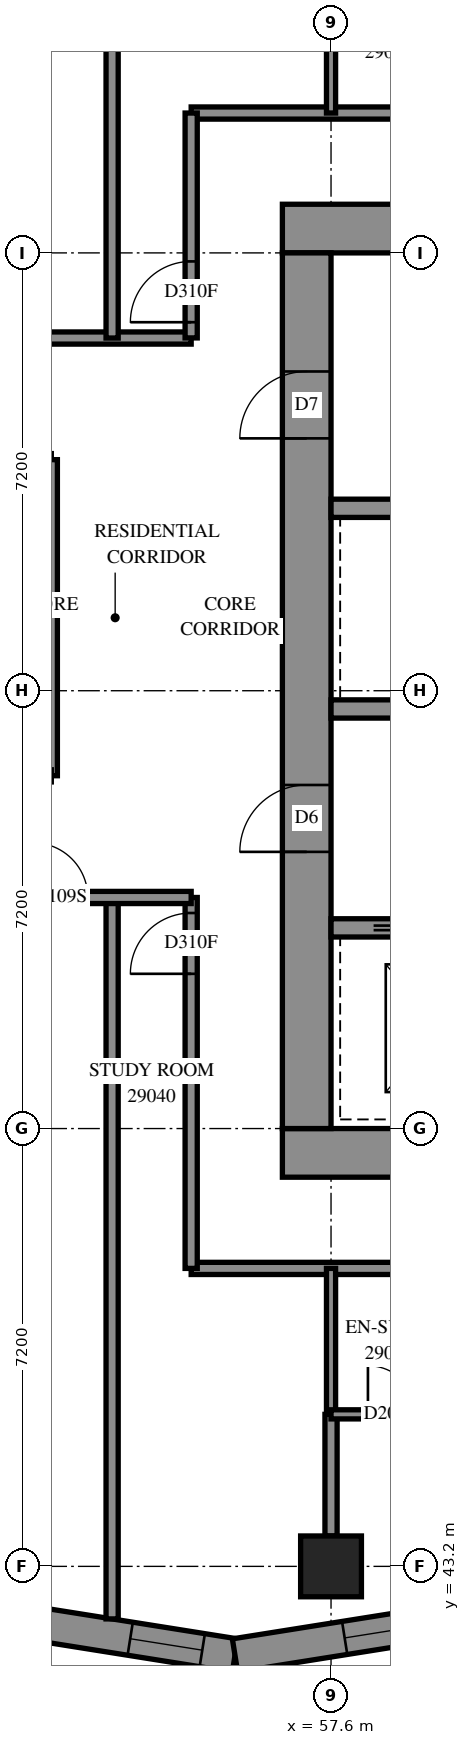
"""IFC4 building model, lengths in metres.
Left out: names, types, materials, properties, quantities, classifications, styles, units other than length and angle.
Written with IfcOpenShell. Run it as: python <this file> out.ifc"""

import sys

from ifc_helpers import new_model, si_unit, direction, frame, frame_2d, origin, origin_2d, place, context, subcontext, project, spatial, polyline, rectangle, outline, extrude, element, fill, save


model = new_model("IFC4")
c1 = context("Model", 3, precision=1e-05, world=origin(), true_north=direction((0.0, 1.0)))
c2 = subcontext(c1, "Body", "Model", "MODEL_VIEW")
j1 = project(units=[si_unit("LENGTHUNIT", "METRE"), si_unit("PLANEANGLEUNIT", "RADIAN")], contexts=[c1])
p1 = place(None, origin())
s1 = spatial("IfcSite", under=j1, at=p1, CompositionType="ELEMENT")
p2 = place(p1, origin())
s2 = spatial("IfcBuilding", under=s1, at=p2, CompositionType="ELEMENT")
p3 = place(p2, frame((0.0, 0.0, 108.4)))
s3 = spatial("IfcBuildingStorey", under=s2, at=p3, CompositionType="ELEMENT", Elevation=108.4)
p4 = place(p3, frame((57.6, 43.2, 0.0), z_axis=(0.0, 0.0, 1.0), x_axis=(1.0, 0.0, 0.0)))
e1 = element("IfcColumn", 1, at=p4, inside=s3, PredefinedType="COLUMN", context=c2, shape_type="SweptSolid", body=[
    extrude(rectangle(XDim=1.0, YDim=1.0, at=origin_2d()), origin(), (0.0, 0.0, 1.0), 3.1),
])
p5 = place(p3, frame((56.8, 50.0, -0.3), z_axis=(0.0, 0.0, 1.0), x_axis=(1.0, 0.0, 0.0)))
e2 = element("IfcWall", 2, at=p5, inside=s3, PredefinedType="SHEAR", context=c2, shape_type="SweptSolid", body=[
    extrude(rectangle(XDim=16.0, YDim=0.8, at=frame_2d((8.0, 0.0))), origin(), (0.0, 0.0, 1.0), 2.7),
])
p6 = place(p3, frame((56.8, 65.2, -0.3), z_axis=(0.0, 0.0, 1.0), x_axis=(1.0, 0.0, 0.0)))
e3 = element("IfcWall", 3, at=p6, inside=s3, PredefinedType="SHEAR", context=c2, shape_type="SweptSolid", body=[
    extrude(rectangle(XDim=16.0, YDim=0.8, at=frame_2d((8.0, 0.0))), origin(), (0.0, 0.0, 1.0), 2.7),
])
p7 = place(p6, frame((10.8, 0.0, 0.3)))
e4 = element("IfcOpeningElement", 4, at=p7, cuts=e3, PredefinedType="OPENING", context=c2, shape_type="SweptSolid", body=[
    extrude(rectangle(XDim=0.8, YDim=2.1, at=frame_2d((0.4, 1.05))), frame((0.0, 0.41, 0.0), z_axis=(0.0, -1.0, 0.0), x_axis=(1.0, 0.0, 0.0)), (0.0, 0.0, 1.0), 0.82),
])
p8 = place(p3, frame((57.2, 50.4, -0.3), z_axis=(0.0, 0.0, 1.0), x_axis=(0.0, 1.0, 0.0)))
e5 = element("IfcWall", 5, at=p8, inside=s3, PredefinedType="SHEAR", context=c2, shape_type="SweptSolid", body=[
    extrude(rectangle(XDim=14.4, YDim=0.8, at=frame_2d((7.2, 0.0))), origin(), (0.0, 0.0, 1.0), 2.7),
])
p9 = place(p8, frame((4.55, 0.0, 0.3)))
e6 = element("IfcOpeningElement", 6, at=p9, cuts=e5, PredefinedType="OPENING", context=c2, shape_type="SweptSolid", body=[
    extrude(rectangle(XDim=1.1, YDim=2.1, at=frame_2d((0.55, 1.05))), frame((0.0, 0.41, 0.0), z_axis=(0.0, -1.0, 0.0), x_axis=(1.0, 0.0, 0.0)), (0.0, 0.0, 1.0), 0.82),
])
p10 = place(p8, frame((11.35, 0.0, 0.3)))
e7 = element("IfcOpeningElement", 7, at=p10, cuts=e5, PredefinedType="OPENING", context=c2, shape_type="SweptSolid", body=[
    extrude(rectangle(XDim=1.1, YDim=2.1, at=frame_2d((0.55, 1.05))), frame((0.0, 0.41, 0.0), z_axis=(0.0, -1.0, 0.0), x_axis=(1.0, 0.0, 0.0)), (0.0, 0.0, 1.0), 0.82),
])
p11 = place(p3, frame((57.6, 53.7, 0.0), z_axis=(0.0, 0.0, 1.0), x_axis=(1.0, 0.0, 0.0)))
e8 = element("IfcWall", 8, at=p11, inside=s3, PredefinedType="SOLIDWALL", context=c2, shape_type="SweptSolid", body=[
    extrude(rectangle(XDim=14.4, YDim=0.3, at=frame_2d((7.2, 0.0))), origin(), (0.0, 0.0, 1.0), 3.1),
])
p12 = place(p11, frame((1.25, 0.0, 0.0)))
e9 = element("IfcOpeningElement", 9, at=p12, cuts=e8, PredefinedType="OPENING", context=c2, shape_type="SweptSolid", body=[
    extrude(rectangle(XDim=1.1, YDim=2.1, at=frame_2d((0.55, 1.05))), frame((0.0, 0.16, 0.0), z_axis=(0.0, -1.0, 0.0), x_axis=(1.0, 0.0, 0.0)), (0.0, 0.0, 1.0), 0.32),
])
p13 = place(p11, frame((4.85, 0.0, 0.0)))
e10 = element("IfcOpeningElement", 10, at=p13, cuts=e8, PredefinedType="OPENING", context=c2, shape_type="SweptSolid", body=[
    extrude(rectangle(XDim=1.1, YDim=2.1, at=frame_2d((0.55, 1.05))), frame((0.0, 0.16, 0.0), z_axis=(0.0, -1.0, 0.0), x_axis=(1.0, 0.0, 0.0)), (0.0, 0.0, 1.0), 0.32),
])
p14 = place(p11, frame((8.45, 0.0, 0.0)))
e11 = element("IfcOpeningElement", 11, at=p14, cuts=e8, PredefinedType="OPENING", context=c2, shape_type="SweptSolid", body=[
    extrude(rectangle(XDim=1.1, YDim=2.1, at=frame_2d((0.55, 1.05))), frame((0.0, 0.16, 0.0), z_axis=(0.0, -1.0, 0.0), x_axis=(1.0, 0.0, 0.0)), (0.0, 0.0, 1.0), 0.32),
])
p15 = place(p11, frame((12.05, 0.0, 0.0)))
e12 = element("IfcOpeningElement", 12, at=p15, cuts=e8, PredefinedType="OPENING", context=c2, shape_type="SweptSolid", body=[
    extrude(rectangle(XDim=1.1, YDim=2.1, at=frame_2d((0.55, 1.05))), frame((0.0, 0.16, 0.0), z_axis=(0.0, -1.0, 0.0), x_axis=(1.0, 0.0, 0.0)), (0.0, 0.0, 1.0), 0.32),
])
p16 = place(p3, frame((57.6, 57.3, 0.0), z_axis=(0.0, 0.0, 1.0), x_axis=(1.0, 0.0, 0.0)))
e13 = element("IfcWall", 13, at=p16, inside=s3, PredefinedType="SOLIDWALL", context=c2, shape_type="SweptSolid", body=[
    extrude(rectangle(XDim=14.4, YDim=0.3, at=frame_2d((7.2, 0.0))), origin(), (0.0, 0.0, 1.0), 3.1),
])
p17 = place(p16, frame((12.05, 0.0, 0.0)))
e14 = element("IfcOpeningElement", 14, at=p17, cuts=e13, PredefinedType="OPENING", context=c2, shape_type="SweptSolid", body=[
    extrude(rectangle(XDim=1.1, YDim=2.1, at=frame_2d((0.55, 1.05))), frame((0.0, 0.16, 0.0), z_axis=(0.0, -1.0, 0.0), x_axis=(1.0, 0.0, 0.0)), (0.0, 0.0, 1.0), 0.32),
])
p18 = place(p3, frame((57.6, 60.6, 0.0), z_axis=(0.0, 0.0, 1.0), x_axis=(1.0, 0.0, 0.0)))
e15 = element("IfcWall", 15, at=p18, inside=s3, PredefinedType="SOLIDWALL", context=c2, shape_type="SweptSolid", body=[
    extrude(rectangle(XDim=7.2, YDim=0.3, at=frame_2d((3.6, 0.0))), origin(), (0.0, 0.0, 1.0), 3.1),
])
p19 = place(p3, frame((52.587, 42.282, 0.0), z_axis=(0.0, 0.0, 1.0), x_axis=(0.9876057519, -0.1569550219, 0.0)))
e16 = element("IfcWall", 16, at=p19, inside=s3, PredefinedType="SOLIDWALL", context=c2, shape_type="SweptSolid", body=[
    extrude(outline(polyline([(0.067, -0.275), (3.521, -0.275), (3.433, 0.275), (-0.067, 0.275), (0.067, -0.275)])), origin(), (0.0, 0.0, 1.0), 3.1),
])
p20 = place(p19, frame((1.732, 0.0, 0.5)))
e17 = element("IfcOpeningElement", 17, at=p20, cuts=e16, PredefinedType="OPENING", context=c2, shape_type="SweptSolid", body=[
    extrude(rectangle(XDim=1.2, YDim=2.45, at=frame_2d((0.6, 1.225))), frame((0.0, 0.285, 0.0), z_axis=(0.0, -1.0, 0.0), x_axis=(1.0, 0.0, 0.0)), (0.0, 0.0, 1.0), 0.57),
])
p21 = place(p3, frame((56.021, 41.736, 0.0), z_axis=(0.0, 0.0, 1.0), x_axis=(0.9876056196, 0.1569558544, 0.0)))
e18 = element("IfcWall", 18, at=p21, inside=s3, PredefinedType="SOLIDWALL", context=c2, shape_type="SweptSolid", body=[
    extrude(outline(polyline([(-0.044, -0.275), (3.409, -0.275), (3.497, 0.275), (0.044, 0.275), (-0.044, -0.275)])), origin(), (0.0, 0.0, 1.0), 3.1),
])
p22 = place(p21, frame((1.826, 0.0, 0.5)))
e19 = element("IfcOpeningElement", 19, at=p22, cuts=e18, PredefinedType="OPENING", context=c2, shape_type="SweptSolid", body=[
    extrude(rectangle(XDim=1.2, YDim=2.45, at=frame_2d((0.6, 1.225))), frame((0.0, 0.285, 0.0), z_axis=(0.0, -1.0, 0.0), x_axis=(1.0, 0.0, 0.0)), (0.0, 0.0, 1.0), 0.57),
])
p23 = place(p3, frame((33.4, 63.4, 0.0), z_axis=(0.0, 0.0, 1.0), x_axis=(1.0, 0.0, 0.0)))
e20 = element("IfcWall", 20, at=p23, inside=s3, PredefinedType="PARTITIONING", context=c2, shape_type="SweptSolid", body=[
    extrude(rectangle(XDim=21.9, YDim=0.2, at=frame_2d((10.95, 0.0))), origin(), (0.0, 0.0, 1.0), 3.1),
])
p24 = place(p23, frame((3.152, 0.0, 0.0)))
e21 = element("IfcOpeningElement", 21, at=p24, cuts=e20, PredefinedType="OPENING", context=c2, shape_type="SweptSolid", body=[
    extrude(rectangle(XDim=0.9, YDim=2.1, at=frame_2d((0.45, 1.05))), frame((0.0, 0.11, 0.0), z_axis=(0.0, -1.0, 0.0), x_axis=(1.0, 0.0, 0.0)), (0.0, 0.0, 1.0), 0.22),
])
p25 = place(p23, frame((8.161, 0.0, 0.0)))
e22 = element("IfcOpeningElement", 22, at=p25, cuts=e20, PredefinedType="OPENING", context=c2, shape_type="SweptSolid", body=[
    extrude(rectangle(XDim=0.9, YDim=2.1, at=frame_2d((0.45, 1.05))), frame((0.0, 0.11, 0.0), z_axis=(0.0, -1.0, 0.0), x_axis=(1.0, 0.0, 0.0)), (0.0, 0.0, 1.0), 0.22),
])
p26 = place(p23, frame((15.471, 0.0, 0.0)))
e23 = element("IfcOpeningElement", 23, at=p26, cuts=e20, PredefinedType="OPENING", context=c2, shape_type="SweptSolid", body=[
    extrude(rectangle(XDim=1.0, YDim=2.1, at=frame_2d((0.5, 1.05))), frame((0.0, 0.11, 0.0), z_axis=(0.0, -1.0, 0.0), x_axis=(1.0, 0.0, 0.0)), (0.0, 0.0, 1.0), 0.22),
])
p27 = place(p3, frame((55.3, 48.1, 0.0), z_axis=(0.0, 0.0, 1.0), x_axis=(1.0, 0.0, 0.0)))
e24 = element("IfcWall", 24, at=p27, inside=s3, PredefinedType="PARTITIONING", context=c2, shape_type="SweptSolid", body=[
    extrude(rectangle(XDim=19.092, YDim=0.2, at=frame_2d((9.546, 0.0))), origin(), (0.0, 0.0, 1.0), 3.1),
])
p28 = place(p27, frame((4.6, 0.0, 0.0)))
e25 = element("IfcOpeningElement", 25, at=p28, cuts=e24, PredefinedType="OPENING", context=c2, shape_type="SweptSolid", body=[
    extrude(rectangle(XDim=0.9, YDim=2.1, at=frame_2d((0.45, 1.05))), frame((0.0, 0.11, 0.0), z_axis=(0.0, -1.0, 0.0), x_axis=(1.0, 0.0, 0.0)), (0.0, 0.0, 1.0), 0.22),
])
p29 = place(p27, frame((8.239, 0.0, 0.0)))
e26 = element("IfcOpeningElement", 26, at=p29, cuts=e24, PredefinedType="OPENING", context=c2, shape_type="SweptSolid", body=[
    extrude(rectangle(XDim=0.9, YDim=2.1, at=frame_2d((0.45, 1.05))), frame((0.0, 0.11, 0.0), z_axis=(0.0, -1.0, 0.0), x_axis=(1.0, 0.0, 0.0)), (0.0, 0.0, 1.0), 0.22),
])
p30 = place(p27, frame((13.5, 0.0, 0.0)))
e27 = element("IfcOpeningElement", 27, at=p30, cuts=e24, PredefinedType="OPENING", context=c2, shape_type="SweptSolid", body=[
    extrude(rectangle(XDim=0.9, YDim=2.1, at=frame_2d((0.45, 1.05))), frame((0.0, 0.11, 0.0), z_axis=(0.0, -1.0, 0.0), x_axis=(1.0, 0.0, 0.0)), (0.0, 0.0, 1.0), 0.22),
])
p31 = place(p3, frame((55.3, 67.1, 0.0), z_axis=(0.0, 0.0, 1.0), x_axis=(1.0, 0.0, 0.0)))
e28 = element("IfcWall", 28, at=p31, inside=s3, PredefinedType="PARTITIONING", context=c2, shape_type="SweptSolid", body=[
    extrude(rectangle(XDim=19.0, YDim=0.2, at=frame_2d((9.5, 0.0))), origin(), (0.0, 0.0, 1.0), 3.1),
])
p32 = place(p31, frame((6.199, 0.0, 0.0)))
e29 = element("IfcOpeningElement", 29, at=p32, cuts=e28, PredefinedType="OPENING", context=c2, shape_type="SweptSolid", body=[
    extrude(rectangle(XDim=0.9, YDim=2.1, at=frame_2d((0.45, 1.05))), frame((0.0, 0.11, 0.0), z_axis=(0.0, -1.0, 0.0), x_axis=(1.0, 0.0, 0.0)), (0.0, 0.0, 1.0), 0.22),
])
p33 = place(p31, frame((13.399, 0.0, 0.0)))
e30 = element("IfcOpeningElement", 30, at=p33, cuts=e28, PredefinedType="OPENING", context=c2, shape_type="SweptSolid", body=[
    extrude(rectangle(XDim=0.9, YDim=2.1, at=frame_2d((0.45, 1.05))), frame((0.0, 0.11, 0.0), z_axis=(0.0, -1.0, 0.0), x_axis=(1.0, 0.0, 0.0)), (0.0, 0.0, 1.0), 0.22),
])
p34 = place(p3, frame((54.0, 42.336, 0.0), z_axis=(0.0, 0.0, 1.0), x_axis=(0.0, 1.0, 0.0)))
e31 = element("IfcWall", 31, at=p34, inside=s3, PredefinedType="PARTITIONING", context=c2, shape_type="SweptSolid", body=[
    extrude(rectangle(XDim=11.864, YDim=0.2, at=frame_2d((5.932, 0.0))), origin(), (0.0, 0.0, 1.0), 3.1),
])
p35 = place(p3, frame((54.0, 63.4, 0.0), z_axis=(0.0, 0.0, 1.0), x_axis=(0.0, 1.0, 0.0)))
e32 = element("IfcWall", 32, at=p35, inside=s3, PredefinedType="PARTITIONING", context=c2, shape_type="SweptSolid", body=[
    extrude(rectangle(XDim=9.313, YDim=0.2, at=frame_2d((4.656, 0.0))), origin(), (0.0, 0.0, 1.0), 3.1),
])
p36 = place(p3, frame((55.3, 48.1, 0.0), z_axis=(0.0, 0.0, 1.0), x_axis=(0.0, 1.0, 0.0)))
e33 = element("IfcWall", 33, at=p36, inside=s3, PredefinedType="PARTITIONING", context=c2, shape_type="SweptSolid", body=[
    extrude(rectangle(XDim=6.1, YDim=0.2, at=frame_2d((3.05, 0.0))), origin(), (0.0, 0.0, 1.0), 3.1),
])
p37 = place(p36, frame((4.845, 0.0, 0.0)))
e34 = element("IfcOpeningElement", 34, at=p37, cuts=e33, PredefinedType="OPENING", context=c2, shape_type="SweptSolid", body=[
    extrude(rectangle(XDim=1.0, YDim=2.1, at=frame_2d((0.5, 1.05))), frame((0.0, 0.11, 0.0), z_axis=(0.0, -1.0, 0.0), x_axis=(1.0, 0.0, 0.0)), (0.0, 0.0, 1.0), 0.22),
])
p38 = place(p3, frame((53.0, 56.202, 0.0), z_axis=(0.0, 0.0, 1.0), x_axis=(0.0, 1.0, 0.0)))
e35 = element("IfcWall", 35, at=p38, inside=s3, PredefinedType="PARTITIONING", context=c2, shape_type="SweptSolid", body=[
    extrude(rectangle(XDim=5.198, YDim=0.2, at=frame_2d((2.599, 0.0))), origin(), (0.0, 0.0, 1.0), 3.1),
])
p39 = place(p3, frame((50.4, 54.2, 0.0), z_axis=(0.0, 0.0, 1.0), x_axis=(1.0, 0.0, 0.0)))
e36 = element("IfcWall", 36, at=p39, inside=s3, PredefinedType="PARTITIONING", context=c2, shape_type="SweptSolid", body=[
    extrude(rectangle(XDim=4.9, YDim=0.2, at=frame_2d((2.45, 0.0))), origin(), (0.0, 0.0, 1.0), 3.1),
])
p40 = place(p39, frame((2.3, 0.0, 0.0)))
e37 = element("IfcOpeningElement", 37, at=p40, cuts=e36, PredefinedType="OPENING", context=c2, shape_type="SweptSolid", body=[
    extrude(rectangle(XDim=0.9, YDim=2.1, at=frame_2d((0.45, 1.05))), frame((0.0, 0.11, 0.0), z_axis=(0.0, -1.0, 0.0), x_axis=(1.0, 0.0, 0.0)), (0.0, 0.0, 1.0), 0.22),
])
p41 = place(p3, frame((55.3, 63.402, 0.0), z_axis=(0.0, 0.0, 1.0), x_axis=(0.0, 1.0, 0.0)))
e38 = element("IfcWall", 38, at=p41, inside=s3, PredefinedType="PARTITIONING", context=c2, shape_type="SweptSolid", body=[
    extrude(rectangle(XDim=3.698, YDim=0.2, at=frame_2d((1.849, 0.0))), origin(), (0.0, 0.0, 1.0), 3.1),
])
p42 = place(p41, frame((0.258, 0.0, 0.0)))
e39 = element("IfcOpeningElement", 39, at=p42, cuts=e38, PredefinedType="OPENING", context=c2, shape_type="SweptSolid", body=[
    extrude(rectangle(XDim=1.0, YDim=2.1, at=frame_2d((0.5, 1.05))), frame((0.0, 0.11, 0.0), z_axis=(0.0, -1.0, 0.0), x_axis=(1.0, 0.0, 0.0)), (0.0, 0.0, 1.0), 0.22),
])
for number, where, z_axis, x_axis in (
    (40, (57.6, 67.1, 0.0), (0.0, 0.0, 1.0), (0.0, 1.0, 0.0)),
    (41, (57.6, 45.7, 0.0), (0.0, 0.0, 1.0), (0.0, 1.0, 0.0)),
):
    element("IfcWall", number, at=place(p3, frame(where, z_axis=z_axis, x_axis=x_axis)), inside=s3, PredefinedType="PARTITIONING", context=c2, shape_type="SweptSolid", body=[
        extrude(rectangle(XDim=2.4, YDim=0.15, at=frame_2d((1.2, 0.0))), origin(), (0.0, 0.0, 1.0), 3.1),
    ])
p43 = place(p3, frame((57.6, 43.7, 0.0), z_axis=(0.0, 0.0, 1.0), x_axis=(0.0, 1.0, 0.0)))
e42 = element("IfcWall", 42, at=p43, inside=s3, PredefinedType="PARTITIONING", context=c2, shape_type="SweptSolid", body=[
    extrude(rectangle(XDim=2.0, YDim=0.2, at=frame_2d((1.0, 0.0))), origin(), (0.0, 0.0, 1.0), 3.1),
])
p44 = place(p3, frame((57.6, 45.7, 0.0), z_axis=(0.0, 0.0, 1.0), x_axis=(1.0, 0.0, 0.0)))
e43 = element("IfcWall", 43, at=p44, inside=s3, PredefinedType="PARTITIONING", context=c2, shape_type="SweptSolid", body=[
    extrude(rectangle(XDim=1.9, YDim=0.15, at=frame_2d((0.95, 0.0))), origin(), (0.0, 0.0, 1.0), 3.1),
])
p45 = place(p44, frame((0.607, 0.0, 0.0)))
e44 = element("IfcOpeningElement", 44, at=p45, cuts=e43, PredefinedType="OPENING", context=c2, shape_type="SweptSolid", body=[
    extrude(rectangle(XDim=0.8, YDim=2.1, at=frame_2d((0.4, 1.05))), frame((0.0, 0.085, 0.0), z_axis=(0.0, -1.0, 0.0), x_axis=(1.0, 0.0, 0.0)), (0.0, 0.0, 1.0), 0.17),
])
p46 = place(p20, origin())
e45 = element("IfcWindow", 45, at=p46, inside=s3, PartitioningType="SINGLE_PANEL", PredefinedType="WINDOW", context=c2, shape_type="SweptSolid", body=[
    extrude(rectangle(XDim=1.2, YDim=2.45, at=frame_2d((0.6, 1.225))), frame((0.0, 0.155, 0.0), z_axis=(0.0, -1.0, 0.0), x_axis=(1.0, 0.0, 0.0)), (0.0, 0.0, 1.0), 0.06),
])
fill(e17, e45)
p47 = place(p22, origin())
e46 = element("IfcWindow", 46, at=p47, inside=s3, PartitioningType="SINGLE_PANEL", PredefinedType="WINDOW", context=c2, shape_type="SweptSolid", body=[
    extrude(rectangle(XDim=1.2, YDim=2.45, at=frame_2d((0.6, 1.225))), frame((0.0, 0.155, 0.0), z_axis=(0.0, -1.0, 0.0), x_axis=(1.0, 0.0, 0.0)), (0.0, 0.0, 1.0), 0.06),
])
fill(e19, e46)
p48 = place(p9, origin())
e47 = element("IfcDoor", 47, at=p48, inside=s3, OperationType="DOUBLE_DOOR_SINGLE_SWING", PredefinedType="DOOR", context=c2, shape_type="SweptSolid", body=[
    extrude(rectangle(XDim=1.1, YDim=2.1, at=frame_2d((0.55, 1.05))), frame((0.0, 0.025, 0.0), z_axis=(0.0, -1.0, 0.0), x_axis=(1.0, 0.0, 0.0)), (0.0, 0.0, 1.0), 0.05),
])
fill(e6, e47)
p49 = place(p10, origin())
e48 = element("IfcDoor", 48, at=p49, inside=s3, OperationType="SINGLE_SWING_LEFT", PredefinedType="DOOR", context=c2, shape_type="SweptSolid", body=[
    extrude(rectangle(XDim=1.1, YDim=2.1, at=frame_2d((0.55, 1.05))), frame((0.0, 0.025, 0.0), z_axis=(0.0, -1.0, 0.0), x_axis=(1.0, 0.0, 0.0)), (0.0, 0.0, 1.0), 0.05),
])
fill(e7, e48)
p50 = place(p42, origin())
e49 = element("IfcDoor", 49, at=p50, inside=s3, OperationType="SINGLE_SWING_LEFT", PredefinedType="DOOR", context=c2, shape_type="SweptSolid", body=[
    extrude(rectangle(XDim=1.0, YDim=2.1, at=frame_2d((0.5, 1.05))), frame((0.0, 0.025, 0.0), z_axis=(0.0, -1.0, 0.0), x_axis=(1.0, 0.0, 0.0)), (0.0, 0.0, 1.0), 0.05),
])
fill(e39, e49)
p51 = place(p40, origin())
e50 = element("IfcDoor", 50, at=p51, inside=s3, OperationType="SINGLE_SWING_LEFT", PredefinedType="DOOR", context=c2, shape_type="SweptSolid", body=[
    extrude(rectangle(XDim=0.9, YDim=2.1, at=frame_2d((0.45, 1.05))), frame((0.0, 0.025, 0.0), z_axis=(0.0, -1.0, 0.0), x_axis=(1.0, 0.0, 0.0)), (0.0, 0.0, 1.0), 0.05),
])
fill(e37, e50)
p52 = place(p37, origin())
e51 = element("IfcDoor", 51, at=p52, inside=s3, OperationType="SINGLE_SWING_RIGHT", PredefinedType="DOOR", context=c2, shape_type="SweptSolid", body=[
    extrude(rectangle(XDim=1.0, YDim=2.1, at=frame_2d((0.5, 1.05))), frame((0.0, 0.025, 0.0), z_axis=(0.0, -1.0, 0.0), x_axis=(1.0, 0.0, 0.0)), (0.0, 0.0, 1.0), 0.05),
])
fill(e34, e51)
p53 = place(p45, origin())
e52 = element("IfcDoor", 52, at=p53, inside=s3, OperationType="SINGLE_SWING_RIGHT", PredefinedType="DOOR", context=c2, shape_type="SweptSolid", body=[
    extrude(rectangle(XDim=0.8, YDim=2.1, at=frame_2d((0.4, 1.05))), frame((0.0, 0.025, 0.0), z_axis=(0.0, -1.0, 0.0), x_axis=(1.0, 0.0, 0.0)), (0.0, 0.0, 1.0), 0.05),
])
fill(e44, e52)
save(model, sys.argv[1])
